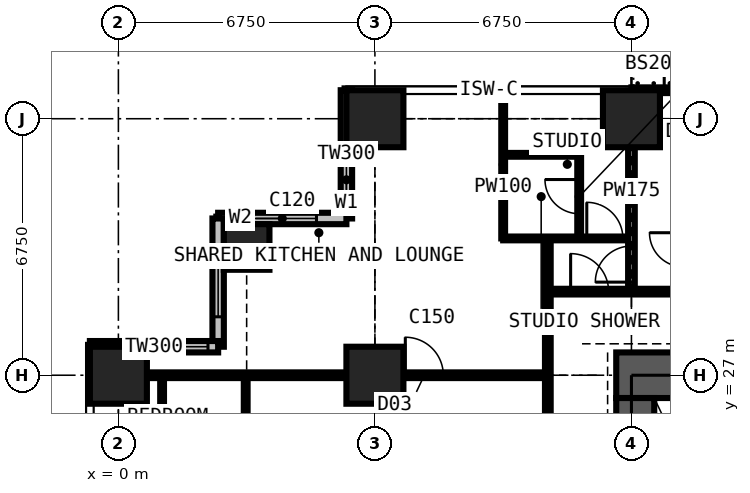
"""IFC4 building model, lengths in metres.
Left out: names, types, materials, properties, quantities, classifications, styles, units other than length and angle.
Written with IfcOpenShell. Run it as: python <this file> out.ifc"""

import sys

from ifc_helpers import new_model, si_unit, direction, frame, frame_2d, origin, origin_2d, place, context, subcontext, project, spatial, rectangle, extrude, element, fill, save


model = new_model("IFC4")
c1 = context("Model", 3, precision=1e-05, world=origin(), true_north=direction((0.0, 1.0)))
c2 = subcontext(c1, "Body", "Model", "MODEL_VIEW")
j1 = project(units=[si_unit("LENGTHUNIT", "METRE"), si_unit("PLANEANGLEUNIT", "RADIAN")], contexts=[c1])
p1 = place(None, origin())
s1 = spatial("IfcSite", under=j1, at=p1, CompositionType="ELEMENT")
p2 = place(p1, origin())
s2 = spatial("IfcBuilding", under=s1, at=p2, CompositionType="ELEMENT")
p3 = place(p2, frame((0.0, 0.0, 156.6)))
s3 = spatial("IfcBuildingStorey", under=s2, at=p3, CompositionType="ELEMENT", Elevation=156.6)
p4 = place(p3, frame((0.0, 27.0, 0.0), z_axis=(0.0, 0.0, 1.0), x_axis=(1.0, 0.0, 0.0)))
e1 = element("IfcColumn", 1, at=p4, inside=s3, PredefinedType="COLUMN", context=c2, shape_type="SweptSolid", body=[
    extrude(rectangle(XDim=1.5, YDim=1.5, at=origin_2d()), origin(), (0.0, 0.0, 1.0), 3.6),
])
p5 = place(p3, frame((3.375, 30.375, 0.0), z_axis=(0.0, 0.0, 1.0), x_axis=(1.0, 0.0, 0.0)))
e2 = element("IfcColumn", 2, at=p5, inside=s3, PredefinedType="COLUMN", context=c2, shape_type="SweptSolid", body=[
    extrude(rectangle(XDim=1.2, YDim=1.2, at=origin_2d()), origin(), (0.0, 0.0, 1.0), 3.6),
])
for number, where, z_axis, x_axis in (
    (3, (6.75, 27.0, 0.0), (0.0, 0.0, 1.0), (1.0, 0.0, 0.0)),
    (4, (6.75, 33.75, 0.0), (0.0, 0.0, 1.0), (1.0, 0.0, 0.0)),
    (5, (13.5, 33.75, 0.0), (0.0, 0.0, 1.0), (1.0, 0.0, 0.0)),
):
    element("IfcColumn", number, at=place(p3, frame(where, z_axis=z_axis, x_axis=x_axis)), inside=s3, PredefinedType="COLUMN", context=c2, shape_type="SweptSolid", body=[
        extrude(rectangle(XDim=1.5, YDim=1.5, at=origin_2d()), origin(), (0.0, 0.0, 1.0), 3.6),
    ])
p6 = place(p3, frame((27.4, 27.0, 0.0), z_axis=(0.0, 0.0, 1.0), x_axis=(-1.0, 0.0, 0.0)))
e6 = element("IfcWall", 6, at=p6, inside=s3, PredefinedType="SHEAR", context=c2, shape_type="SweptSolid", body=[
    extrude(rectangle(XDim=14.3, YDim=1.2, at=frame_2d((7.15, 0.0))), origin(), (0.0, 0.0, 1.0), 3.6),
])
p7 = place(p6, frame((5.225, 0.0, 0.0)))
e7 = element("IfcOpeningElement", 7, at=p7, cuts=e6, PredefinedType="OPENING", context=c2, shape_type="SweptSolid", body=[
    extrude(rectangle(XDim=0.9, YDim=2.2, at=frame_2d((0.45, 1.1))), frame((0.0, 0.61, 0.0), z_axis=(0.0, -1.0, 0.0), x_axis=(1.0, 0.0, 0.0)), (0.0, 0.0, 1.0), 1.22),
])
p8 = place(p6, frame((8.2, 0.0, 0.0)))
e8 = element("IfcOpeningElement", 8, at=p8, cuts=e6, PredefinedType="OPENING", context=c2, shape_type="SweptSolid", body=[
    extrude(rectangle(XDim=1.0, YDim=2.2, at=frame_2d((0.5, 1.1))), frame((0.0, 0.61, 0.0), z_axis=(0.0, -1.0, 0.0), x_axis=(1.0, 0.0, 0.0)), (0.0, 0.0, 1.0), 1.22),
])
p9 = place(p3, frame((13.6, 26.4, 0.0), z_axis=(0.0, 0.0, 1.0), x_axis=(0.0, -1.0, 0.0)))
e9 = element("IfcWall", 9, at=p9, inside=s3, PredefinedType="SHEAR", context=c2, shape_type="SweptSolid", body=[
    extrude(rectangle(XDim=12.3, YDim=1.0, at=frame_2d((6.15, 0.0))), origin(), (0.0, 0.0, 1.0), 3.6),
])
p10 = place(p9, frame((7.45, 0.0, 0.0)))
e10 = element("IfcOpeningElement", 10, at=p10, cuts=e9, PredefinedType="OPENING", context=c2, shape_type="SweptSolid", body=[
    extrude(rectangle(XDim=1.2, YDim=2.2, at=frame_2d((0.6, 1.1))), frame((0.0, 0.51, 0.0), z_axis=(0.0, -1.0, 0.0), x_axis=(1.0, 0.0, 0.0)), (0.0, 0.0, 1.0), 1.02),
])
p11 = place(p3, frame((13.5, 34.5, 0.0), z_axis=(0.0, 0.0, 1.0), x_axis=(1.0, 0.0, 0.0)))
e11 = element("IfcWall", 11, at=p11, inside=s3, PredefinedType="SOLIDWALL", context=c2, shape_type="SweptSolid", body=[
    extrude(rectangle(XDim=6.75, YDim=0.15, at=frame_2d((3.375, 0.0))), origin(), (0.0, 0.0, 1.0), 3.375),
])
p12 = place(p11, frame((0.863, 0.0, 0.0)))
e12 = element("IfcOpeningElement", 12, at=p12, cuts=e11, PredefinedType="OPENING", context=c2, shape_type="SweptSolid", body=[
    extrude(rectangle(XDim=1.0, YDim=2.2, at=frame_2d((0.5, 1.1))), frame((0.0, 0.085, 0.0), z_axis=(0.0, -1.0, 0.0), x_axis=(1.0, 0.0, 0.0)), (0.0, 0.0, 1.0), 0.17),
])
p13 = place(p11, frame((1.975, 0.0, 0.9)))
e13 = element("IfcOpeningElement", 13, at=p13, cuts=e11, PredefinedType="OPENING", context=c2, shape_type="SweptSolid", body=[
    extrude(rectangle(XDim=1.2, YDim=1.8, at=frame_2d((0.6, 0.9))), frame((0.0, 0.085, 0.0), z_axis=(0.0, -1.0, 0.0), x_axis=(1.0, 0.0, 0.0)), (0.0, 0.0, 1.0), 0.17),
])
p14 = place(p11, frame((4.887, 0.0, 0.0)))
e14 = element("IfcOpeningElement", 14, at=p14, cuts=e11, PredefinedType="OPENING", context=c2, shape_type="SweptSolid", body=[
    extrude(rectangle(XDim=1.0, YDim=2.2, at=frame_2d((0.5, 1.1))), frame((0.0, 0.085, 0.0), z_axis=(0.0, -1.0, 0.0), x_axis=(1.0, 0.0, 0.0)), (0.0, 0.0, 1.0), 0.17),
])
p15 = place(p11, frame((3.575, 0.0, 0.9)))
e15 = element("IfcOpeningElement", 15, at=p15, cuts=e11, PredefinedType="OPENING", context=c2, shape_type="SweptSolid", body=[
    extrude(rectangle(XDim=1.2, YDim=1.8, at=frame_2d((0.6, 0.9))), frame((0.0, 0.085, 0.0), z_axis=(0.0, -1.0, 0.0), x_axis=(1.0, 0.0, 0.0)), (0.0, 0.0, 1.0), 0.17),
])
p16 = place(p3, frame((6.0, 34.5, 0.0), z_axis=(0.0, 0.0, 1.0), x_axis=(0.0, -1.0, 0.0)))
e16 = element("IfcWall", 16, at=p16, inside=s3, PredefinedType="SOLIDWALL", context=c2, shape_type="SweptSolid", body=[
    extrude(rectangle(XDim=3.375, YDim=0.3, at=frame_2d((1.688, 0.0))), origin(), (0.0, 0.0, 1.0), 3.375),
])
p17 = place(p16, frame((1.607, 0.0, 0.9)))
e17 = element("IfcOpeningElement", 17, at=p17, cuts=e16, PredefinedType="OPENING", context=c2, shape_type="SweptSolid", body=[
    extrude(rectangle(XDim=1.5, YDim=1.8, at=frame_2d((0.75, 0.9))), frame((0.0, 0.16, 0.0), z_axis=(0.0, -1.0, 0.0), x_axis=(1.0, 0.0, 0.0)), (0.0, 0.0, 1.0), 0.32),
])
p18 = place(p3, frame((6.0, 31.125, 0.0), z_axis=(0.0, 0.0, 1.0), x_axis=(-1.0, 0.0, 0.0)))
e18 = element("IfcWall", 18, at=p18, inside=s3, PredefinedType="SOLIDWALL", context=c2, shape_type="SweptSolid", body=[
    extrude(rectangle(XDim=3.375, YDim=0.3, at=frame_2d((1.688, 0.0))), origin(), (0.0, 0.0, 1.0), 3.375),
])
p19 = place(p18, frame((0.788, 0.0, 0.6)))
e19 = element("IfcOpeningElement", 19, at=p19, cuts=e18, PredefinedType="OPENING", context=c2, shape_type="SweptSolid", body=[
    extrude(rectangle(XDim=1.8, YDim=2.1, at=frame_2d((0.9, 1.05))), frame((0.0, 0.16, 0.0), z_axis=(0.0, -1.0, 0.0), x_axis=(1.0, 0.0, 0.0)), (0.0, 0.0, 1.0), 0.32),
])
p20 = place(p3, frame((2.625, 31.125, 0.0), z_axis=(0.0, 0.0, 1.0), x_axis=(0.0, -1.0, 0.0)))
e20 = element("IfcWall", 20, at=p20, inside=s3, PredefinedType="SOLIDWALL", context=c2, shape_type="SweptSolid", body=[
    extrude(rectangle(XDim=3.375, YDim=0.3, at=frame_2d((1.688, 0.0))), origin(), (0.0, 0.0, 1.0), 3.375),
])
p21 = place(p20, frame((0.788, 0.0, 0.6)))
e21 = element("IfcOpeningElement", 21, at=p21, cuts=e20, PredefinedType="OPENING", context=c2, shape_type="SweptSolid", body=[
    extrude(rectangle(XDim=1.8, YDim=2.1, at=frame_2d((0.9, 1.05))), frame((0.0, 0.16, 0.0), z_axis=(0.0, -1.0, 0.0), x_axis=(1.0, 0.0, 0.0)), (0.0, 0.0, 1.0), 0.32),
])
p22 = place(p3, frame((2.625, 27.75, 0.0), z_axis=(0.0, 0.0, 1.0), x_axis=(-1.0, 0.0, 0.0)))
e22 = element("IfcWall", 22, at=p22, inside=s3, PredefinedType="SOLIDWALL", context=c2, shape_type="SweptSolid", body=[
    extrude(rectangle(XDim=3.375, YDim=0.3, at=frame_2d((1.688, 0.0))), origin(), (0.0, 0.0, 1.0), 3.375),
])
p23 = place(p22, frame((0.268, 0.0, 0.9)))
e23 = element("IfcOpeningElement", 23, at=p23, cuts=e22, PredefinedType="OPENING", context=c2, shape_type="SweptSolid", body=[
    extrude(rectangle(XDim=1.5, YDim=1.8, at=frame_2d((0.75, 0.9))), frame((0.0, 0.16, 0.0), z_axis=(0.0, -1.0, 0.0), x_axis=(1.0, 0.0, 0.0)), (0.0, 0.0, 1.0), 0.32),
])
p24 = place(p3, frame((-0.734, 27.0, 0.0), z_axis=(0.0, 0.0, 1.0), x_axis=(1.0, 0.0, 0.0)))
e24 = element("IfcWall", 24, at=p24, inside=s3, PredefinedType="PARTITIONING", context=c2, shape_type="SweptSolid", body=[
    extrude(rectangle(XDim=12.034, YDim=0.15, at=frame_2d((6.017, 0.0))), origin(), (0.0, 0.0, 1.0), 2.806),
])
p25 = place(p24, frame((8.284, 0.0, 0.0)))
e25 = element("IfcOpeningElement", 25, at=p25, cuts=e24, PredefinedType="OPENING", context=c2, shape_type="SweptSolid", body=[
    extrude(rectangle(XDim=1.0, YDim=2.2, at=frame_2d((0.5, 1.1))), frame((0.0, 0.085, 0.0), z_axis=(0.0, -1.0, 0.0), x_axis=(1.0, 0.0, 0.0)), (0.0, 0.0, 1.0), 0.17),
])
p26 = place(p3, frame((1.15, 25.0, 0.0), z_axis=(0.0, 0.0, 1.0), x_axis=(0.0, 1.0, 0.0)))
e26 = element("IfcWall", 26, at=p26, inside=s3, PredefinedType="PARTITIONING", context=c2, shape_type="SweptSolid", body=[
    extrude(rectangle(XDim=2.0, YDim=0.1, at=frame_2d((1.0, 0.0))), origin(), (0.0, 0.0, 1.0), 3.375),
])
p27 = place(p3, frame((3.35, 10.125, 0.0), z_axis=(0.0, 0.0, 1.0), x_axis=(0.0, 1.0, 0.0)))
e27 = element("IfcWall", 27, at=p27, inside=s3, PredefinedType="PARTITIONING", context=c2, shape_type="SweptSolid", body=[
    extrude(rectangle(XDim=16.875, YDim=0.1, at=frame_2d((8.438, 0.0))), origin(), (0.0, 0.0, 1.0), 3.375),
])
p28 = place(p27, frame((13.7, 0.0, 0.0)))
e28 = element("IfcOpeningElement", 28, at=p28, cuts=e27, PredefinedType="OPENING", context=c2, shape_type="SweptSolid", body=[
    extrude(rectangle(XDim=0.95, YDim=2.2, at=frame_2d((0.475, 1.1))), frame((0.0, 0.06, 0.0), z_axis=(0.0, -1.0, 0.0), x_axis=(1.0, 0.0, 0.0)), (0.0, 0.0, 1.0), 0.12),
])
p29 = place(p27, frame((0.2, 0.0, 0.0)))
e29 = element("IfcOpeningElement", 29, at=p29, cuts=e27, PredefinedType="OPENING", context=c2, shape_type="SweptSolid", body=[
    extrude(rectangle(XDim=0.95, YDim=2.2, at=frame_2d((0.475, 1.1))), frame((0.0, 0.06, 0.0), z_axis=(0.0, -1.0, 0.0), x_axis=(1.0, 0.0, 0.0)), (0.0, 0.0, 1.0), 0.12),
])
p30 = place(p27, frame((3.575, 0.0, 0.0)))
e30 = element("IfcOpeningElement", 30, at=p30, cuts=e27, PredefinedType="OPENING", context=c2, shape_type="SweptSolid", body=[
    extrude(rectangle(XDim=0.95, YDim=2.2, at=frame_2d((0.475, 1.1))), frame((0.0, 0.06, 0.0), z_axis=(0.0, -1.0, 0.0), x_axis=(1.0, 0.0, 0.0)), (0.0, 0.0, 1.0), 0.12),
])
p31 = place(p27, frame((6.95, 0.0, 0.0)))
e31 = element("IfcOpeningElement", 31, at=p31, cuts=e27, PredefinedType="OPENING", context=c2, shape_type="SweptSolid", body=[
    extrude(rectangle(XDim=0.95, YDim=2.2, at=frame_2d((0.475, 1.1))), frame((0.0, 0.06, 0.0), z_axis=(0.0, -1.0, 0.0), x_axis=(1.0, 0.0, 0.0)), (0.0, 0.0, 1.0), 0.12),
])
p32 = place(p27, frame((10.325, 0.0, 0.0)))
e32 = element("IfcOpeningElement", 32, at=p32, cuts=e27, PredefinedType="OPENING", context=c2, shape_type="SweptSolid", body=[
    extrude(rectangle(XDim=0.95, YDim=2.2, at=frame_2d((0.475, 1.1))), frame((0.0, 0.06, 0.0), z_axis=(0.0, -1.0, 0.0), x_axis=(1.0, 0.0, 0.0)), (0.0, 0.0, 1.0), 0.12),
])
p33 = place(p3, frame((10.125, 30.6, 0.0), z_axis=(0.0, 0.0, 1.0), x_axis=(0.0, 1.0, 0.0)))
e33 = element("IfcWall", 33, at=p33, inside=s3, PredefinedType="PARTITIONING", context=c2, shape_type="SweptSolid", body=[
    extrude(rectangle(XDim=3.884, YDim=0.1, at=frame_2d((1.942, 0.0))), origin(), (0.0, 0.0, 1.0), 3.375),
])
p34 = place(p3, frame((10.125, 30.6, 0.0), z_axis=(0.0, 0.0, 1.0), x_axis=(1.0, 0.0, 0.0)))
e34 = element("IfcWall", 34, at=p34, inside=s3, PredefinedType="PARTITIONING", context=c2, shape_type="SweptSolid", body=[
    extrude(rectangle(XDim=3.375, YDim=0.1, at=frame_2d((1.688, 0.0))), origin(), (0.0, 0.0, 1.0), 3.375),
])
p35 = place(p34, frame((2.2, 0.0, 0.0)))
e35 = element("IfcOpeningElement", 35, at=p35, cuts=e34, PredefinedType="OPENING", context=c2, shape_type="SweptSolid", body=[
    extrude(rectangle(XDim=0.95, YDim=2.2, at=frame_2d((0.475, 1.1))), frame((0.0, 0.06, 0.0), z_axis=(0.0, -1.0, 0.0), x_axis=(1.0, 0.0, 0.0)), (0.0, 0.0, 1.0), 0.12),
])
p36 = place(p3, frame((10.125, 32.8, 0.0), z_axis=(0.0, 0.0, 1.0), x_axis=(1.0, 0.0, 0.0)))
e36 = element("IfcWall", 36, at=p36, inside=s3, PredefinedType="PARTITIONING", context=c2, shape_type="SweptSolid", body=[
    extrude(rectangle(XDim=2.0, YDim=0.1, at=frame_2d((1.0, 0.0))), origin(), (0.0, 0.0, 1.0), 3.375),
])
p37 = place(p3, frame((11.3, 11.3, 0.0), z_axis=(0.0, 0.0, 1.0), x_axis=(0.0, 1.0, 0.0)))
e37 = element("IfcWall", 37, at=p37, inside=s3, PredefinedType="PARTITIONING", context=c2, shape_type="SweptSolid", body=[
    extrude(rectangle(XDim=19.3, YDim=0.15, at=frame_2d((9.65, 0.0))), origin(), (0.0, 0.0, 1.0), 3.375),
])
p38 = place(p37, frame((13.525, 0.0, 0.0)))
e38 = element("IfcOpeningElement", 38, at=p38, cuts=e37, PredefinedType="OPENING", context=c2, shape_type="SweptSolid", body=[
    extrude(rectangle(XDim=1.0, YDim=2.2, at=frame_2d((0.5, 1.1))), frame((0.0, 0.085, 0.0), z_axis=(0.0, -1.0, 0.0), x_axis=(1.0, 0.0, 0.0)), (0.0, 0.0, 1.0), 0.17),
])
p39 = place(p37, frame((10.438, 0.0, 0.0)))
e39 = element("IfcOpeningElement", 39, at=p39, cuts=e37, PredefinedType="OPENING", context=c2, shape_type="SweptSolid", body=[
    extrude(rectangle(XDim=1.0, YDim=2.2, at=frame_2d((0.5, 1.1))), frame((0.0, 0.085, 0.0), z_axis=(0.0, -1.0, 0.0), x_axis=(1.0, 0.0, 0.0)), (0.0, 0.0, 1.0), 0.17),
])
p40 = place(p3, frame((11.3, 29.2, 0.0), z_axis=(0.0, 0.0, 1.0), x_axis=(1.0, 0.0, 0.0)))
e40 = element("IfcWall", 40, at=p40, inside=s3, PredefinedType="PARTITIONING", context=c2, shape_type="SweptSolid", body=[
    extrude(rectangle(XDim=19.809, YDim=0.15, at=frame_2d((9.904, 0.0))), origin(), (0.0, 0.0, 1.0), 3.375),
])
p41 = place(p40, frame((14.625, 0.0, 0.0)))
e41 = element("IfcOpeningElement", 41, at=p41, cuts=e40, PredefinedType="OPENING", context=c2, shape_type="SweptSolid", body=[
    extrude(rectangle(XDim=1.0, YDim=2.2, at=frame_2d((0.5, 1.1))), frame((0.0, 0.085, 0.0), z_axis=(0.0, -1.0, 0.0), x_axis=(1.0, 0.0, 0.0)), (0.0, 0.0, 1.0), 0.17),
])
p42 = place(p40, frame((5.825, 0.0, 0.0)))
e42 = element("IfcOpeningElement", 42, at=p42, cuts=e40, PredefinedType="OPENING", context=c2, shape_type="SweptSolid", body=[
    extrude(rectangle(XDim=0.95, YDim=2.2, at=frame_2d((0.475, 1.1))), frame((0.0, 0.085, 0.0), z_axis=(0.0, -1.0, 0.0), x_axis=(1.0, 0.0, 0.0)), (0.0, 0.0, 1.0), 0.17),
])
p43 = place(p40, frame((9.2, 0.0, 0.0)))
e43 = element("IfcOpeningElement", 43, at=p43, cuts=e40, PredefinedType="OPENING", context=c2, shape_type="SweptSolid", body=[
    extrude(rectangle(XDim=0.95, YDim=2.2, at=frame_2d((0.475, 1.1))), frame((0.0, 0.085, 0.0), z_axis=(0.0, -1.0, 0.0), x_axis=(1.0, 0.0, 0.0)), (0.0, 0.0, 1.0), 0.17),
])
p44 = place(p40, frame((0.6, 0.0, 0.0)))
e44 = element("IfcOpeningElement", 44, at=p44, cuts=e40, PredefinedType="OPENING", context=c2, shape_type="SweptSolid", body=[
    extrude(rectangle(XDim=1.0, YDim=2.2, at=frame_2d((0.5, 1.1))), frame((0.0, 0.085, 0.0), z_axis=(0.0, -1.0, 0.0), x_axis=(1.0, 0.0, 0.0)), (0.0, 0.0, 1.0), 0.17),
])
p45 = place(p3, frame((12.125, 30.6, 0.0), z_axis=(0.0, 0.0, 1.0), x_axis=(0.0, 1.0, 0.0)))
e45 = element("IfcWall", 45, at=p45, inside=s3, PredefinedType="PARTITIONING", context=c2, shape_type="SweptSolid", body=[
    extrude(rectangle(XDim=2.2, YDim=0.1, at=frame_2d((1.1, 0.0))), origin(), (0.0, 0.0, 1.0), 3.375),
])
p46 = place(p45, frame((0.65, 0.0, 0.0)))
e46 = element("IfcOpeningElement", 46, at=p46, cuts=e45, PredefinedType="OPENING", context=c2, shape_type="SweptSolid", body=[
    extrude(rectangle(XDim=0.9, YDim=2.2, at=frame_2d((0.45, 1.1))), frame((0.0, 0.06, 0.0), z_axis=(0.0, -1.0, 0.0), x_axis=(1.0, 0.0, 0.0)), (0.0, 0.0, 1.0), 0.12),
])
p47 = place(p3, frame((13.5, 29.2, 0.0), z_axis=(0.0, 0.0, 1.0), x_axis=(0.0, 1.0, 0.0)))
e47 = element("IfcWall", 47, at=p47, inside=s3, PredefinedType="PARTITIONING", context=c2, shape_type="SweptSolid", body=[
    extrude(rectangle(XDim=5.284, YDim=0.175, at=frame_2d((2.642, 0.0))), origin(), (0.0, 0.0, 1.0), 2.806),
])
p48 = place(p47, frame((0.25, 0.0, 0.0)))
e48 = element("IfcOpeningElement", 48, at=p48, cuts=e47, PredefinedType="OPENING", context=c2, shape_type="SweptSolid", body=[
    extrude(rectangle(XDim=0.95, YDim=2.2, at=frame_2d((0.475, 1.1))), frame((0.0, 0.097, 0.0), z_axis=(0.0, -1.0, 0.0), x_axis=(1.0, 0.0, 0.0)), (0.0, 0.0, 1.0), 0.195),
])
p49 = place(p12, origin())
e49 = element("IfcDoor", 49, at=p49, inside=s3, OperationType="SINGLE_SWING_LEFT", PredefinedType="DOOR", context=c2, shape_type="SweptSolid", body=[
    extrude(rectangle(XDim=1.0, YDim=2.2, at=frame_2d((0.5, 1.1))), frame((0.0, 0.025, 0.0), z_axis=(0.0, -1.0, 0.0), x_axis=(1.0, 0.0, 0.0)), (0.0, 0.0, 1.0), 0.05),
])
fill(e12, e49)
p50 = place(p17, origin())
e50 = element("IfcWindow", 50, at=p50, inside=s3, PartitioningType="SINGLE_PANEL", PredefinedType="WINDOW", context=c2, shape_type="SweptSolid", body=[
    extrude(rectangle(XDim=1.5, YDim=1.8, at=frame_2d((0.75, 0.9))), frame((0.0, 0.03, 0.0), z_axis=(0.0, -1.0, 0.0), x_axis=(1.0, 0.0, 0.0)), (0.0, 0.0, 1.0), 0.06),
])
fill(e17, e50)
p51 = place(p19, origin())
e51 = element("IfcWindow", 51, at=p51, inside=s3, PartitioningType="SINGLE_PANEL", PredefinedType="WINDOW", context=c2, shape_type="SweptSolid", body=[
    extrude(rectangle(XDim=1.8, YDim=2.1, at=frame_2d((0.9, 1.05))), frame((0.0, 0.03, 0.0), z_axis=(0.0, -1.0, 0.0), x_axis=(1.0, 0.0, 0.0)), (0.0, 0.0, 1.0), 0.06),
])
fill(e19, e51)
p52 = place(p21, origin())
e52 = element("IfcWindow", 52, at=p52, inside=s3, PartitioningType="SINGLE_PANEL", PredefinedType="WINDOW", context=c2, shape_type="SweptSolid", body=[
    extrude(rectangle(XDim=1.8, YDim=2.1, at=frame_2d((0.9, 1.05))), frame((0.0, 0.03, 0.0), z_axis=(0.0, -1.0, 0.0), x_axis=(1.0, 0.0, 0.0)), (0.0, 0.0, 1.0), 0.06),
])
fill(e21, e52)
p53 = place(p23, origin())
e53 = element("IfcWindow", 53, at=p53, inside=s3, PartitioningType="SINGLE_PANEL", PredefinedType="WINDOW", context=c2, shape_type="SweptSolid", body=[
    extrude(rectangle(XDim=1.5, YDim=1.8, at=frame_2d((0.75, 0.9))), frame((0.0, 0.03, 0.0), z_axis=(0.0, -1.0, 0.0), x_axis=(1.0, 0.0, 0.0)), (0.0, 0.0, 1.0), 0.06),
])
fill(e23, e53)
p54 = place(p35, origin())
e54 = element("IfcDoor", 54, at=p54, inside=s3, OperationType="SINGLE_SWING_LEFT", PredefinedType="DOOR", context=c2, shape_type="SweptSolid", body=[
    extrude(rectangle(XDim=0.95, YDim=2.2, at=frame_2d((0.475, 1.1))), frame((0.0, 0.025, 0.0), z_axis=(0.0, -1.0, 0.0), x_axis=(1.0, 0.0, 0.0)), (0.0, 0.0, 1.0), 0.05),
])
fill(e35, e54)
p55 = place(p46, origin())
e55 = element("IfcDoor", 55, at=p55, inside=s3, OperationType="SINGLE_SWING_RIGHT", PredefinedType="DOOR", context=c2, shape_type="SweptSolid", body=[
    extrude(rectangle(XDim=0.9, YDim=2.2, at=frame_2d((0.45, 1.1))), frame((0.0, 0.025, 0.0), z_axis=(0.0, -1.0, 0.0), x_axis=(1.0, 0.0, 0.0)), (0.0, 0.0, 1.0), 0.05),
])
fill(e46, e55)
p56 = place(p48, origin())
e56 = element("IfcDoor", 56, at=p56, inside=s3, OperationType="SINGLE_SWING_LEFT", PredefinedType="DOOR", context=c2, shape_type="SweptSolid", body=[
    extrude(rectangle(XDim=0.95, YDim=2.2, at=frame_2d((0.475, 1.1))), frame((0.0, 0.025, 0.0), z_axis=(0.0, -1.0, 0.0), x_axis=(1.0, 0.0, 0.0)), (0.0, 0.0, 1.0), 0.05),
])
fill(e48, e56)
p57 = place(p44, origin())
e57 = element("IfcDoor", 57, at=p57, inside=s3, OperationType="SINGLE_SWING_LEFT", PredefinedType="DOOR", context=c2, shape_type="SweptSolid", body=[
    extrude(rectangle(XDim=1.0, YDim=2.2, at=frame_2d((0.5, 1.1))), frame((0.0, 0.025, 0.0), z_axis=(0.0, -1.0, 0.0), x_axis=(1.0, 0.0, 0.0)), (0.0, 0.0, 1.0), 0.05),
])
fill(e44, e57)
p58 = place(p25, origin())
e58 = element("IfcDoor", 58, at=p58, inside=s3, OperationType="SINGLE_SWING_LEFT", PredefinedType="DOOR", context=c2, shape_type="SweptSolid", body=[
    extrude(rectangle(XDim=1.0, YDim=2.2, at=frame_2d((0.5, 1.1))), frame((0.0, 0.025, 0.0), z_axis=(0.0, -1.0, 0.0), x_axis=(1.0, 0.0, 0.0)), (0.0, 0.0, 1.0), 0.05),
])
fill(e25, e58)
save(model, sys.argv[1])
